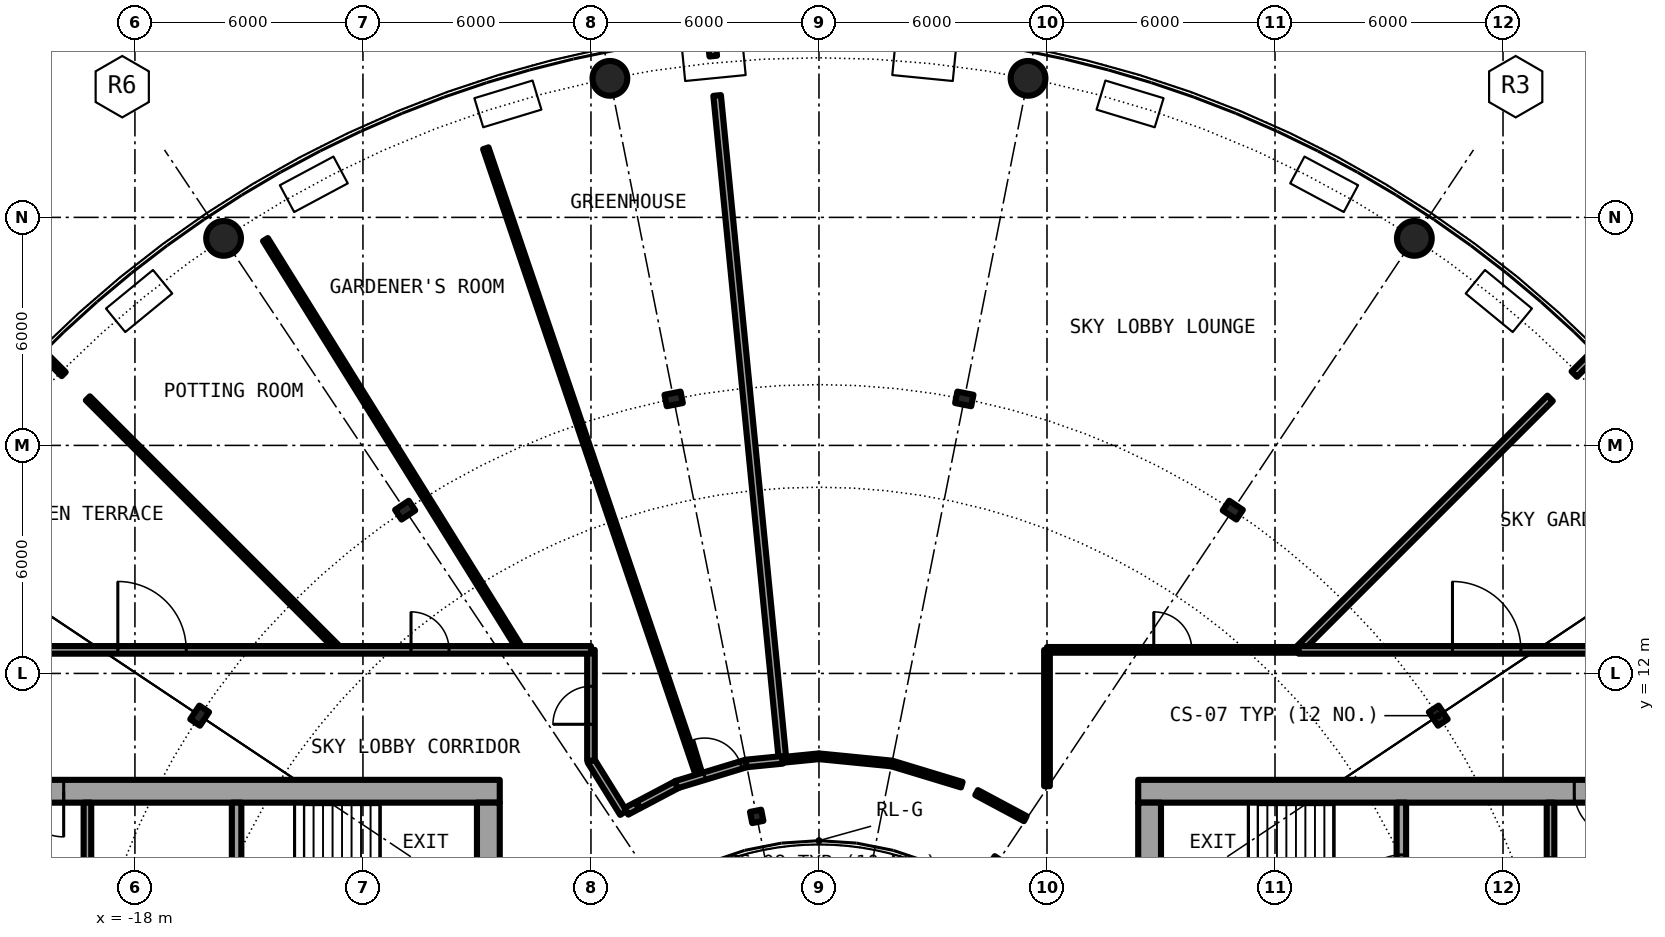
"""IFC4 building model, lengths in metres.
Left out: names, types, materials, properties, quantities, classifications, styles, units other than length and angle.
Written with IfcOpenShell. Run it as: python <this file> out.ifc"""

import sys

from ifc_helpers import new_model, si_unit, direction, frame, frame_2d, origin, origin_2d, place, context, subcontext, project, spatial, rectangle, hollow_circle, i_section, extrude, element, fill, save


model = new_model("IFC4")
c1 = context("Model", 3, precision=1e-05, world=origin(), true_north=direction((0.0, 1.0)))
c2 = subcontext(c1, "Body", "Model", "MODEL_VIEW")
j1 = project(units=[si_unit("LENGTHUNIT", "METRE"), si_unit("PLANEANGLEUNIT", "RADIAN")], contexts=[c1])
p1 = place(None, origin())
s1 = spatial("IfcSite", under=j1, at=p1, CompositionType="ELEMENT")
p2 = place(p1, origin())
s2 = spatial("IfcBuilding", under=s1, at=p2, CompositionType="ELEMENT")
p3 = place(p2, frame((0.0, 0.0, 139.1)))
s3 = spatial("IfcBuildingStorey", under=s2, at=p3, CompositionType="ELEMENT", Elevation=139.1)
for number, where, z_axis, x_axis in (
    (1, (15.667, 23.448, 0.0), (0.0, 0.0, 1.0), (1.0, 0.0, 0.0)),
    (2, (5.501, 27.658, 0.0), (0.0, 0.0, 1.0), (1.0, 0.0, 0.0)),
    (3, (-5.501, 27.658, 0.0), (0.0, 0.0, 1.0), (1.0, 0.0, 0.0)),
    (4, (-15.667, 23.448, 0.0), (0.0, 0.0, 1.0), (1.0, 0.0, 0.0)),
):
    element("IfcColumn", number, at=place(p3, frame(where, z_axis=z_axis, x_axis=x_axis)), inside=s3, PredefinedType="COLUMN", context=c2, shape_type="SweptSolid", body=[
        extrude(hollow_circle(Radius=0.457, WallThickness=0.04, at=origin_2d()), origin(), (0.0, 0.0, 1.0), 6.1),
    ])
for number, where, z_axis, x_axis in (
    (5, (16.297, 10.889, 0.0), (0.0, 0.0, 1.0), (0.831, 0.556, 0.0)),
    (6, (10.889, 16.297, 0.0), (0.0, 0.0, 1.0), (0.556, 0.831, 0.0)),
    (7, (3.824, 19.223, 0.0), (0.0, 0.0, 1.0), (0.195, 0.981, 0.0)),
    (8, (-3.824, 19.223, 0.0), (0.0, 0.0, 1.0), (-0.195, 0.981, 0.0)),
    (9, (-10.889, 16.297, 0.0), (0.0, 0.0, 1.0), (-0.556, 0.831, 0.0)),
    (10, (-16.297, 10.889, 0.0), (0.0, 0.0, 1.0), (-0.831, 0.556, 0.0)),
):
    element("IfcColumn", number, at=place(p3, frame(where, z_axis=z_axis, x_axis=x_axis)), inside=s3, PredefinedType="COLUMN", context=c2, shape_type="SweptSolid", body=[
        extrude(i_section(OverallWidth=0.307, OverallDepth=0.432, WebThickness=0.021, FlangeThickness=0.04, FilletRadius=0.027, at=origin_2d()), origin(), (0.0, 0.0, 1.0), 6.1),
    ])
for number, where, z_axis, x_axis in (
    (11, (4.667, 6.984, 0.0), (0.0, 0.0, 1.0), (0.556, 0.831, 0.0)),
    (12, (-1.639, 8.239, 0.0), (0.0, 0.0, 1.0), (-0.195, 0.981, 0.0)),
):
    element("IfcColumn", number, at=place(p3, frame(where, z_axis=z_axis, x_axis=x_axis)), inside=s3, PredefinedType="COLUMN", context=c2, shape_type="SweptSolid", body=[
        extrude(i_section(OverallWidth=0.3, OverallDepth=0.3, WebThickness=0.011, FlangeThickness=0.019, FilletRadius=0.027, at=origin_2d()), origin(), (0.0, 0.0, 1.0), 6.1),
    ])
p4 = place(p3, frame((22.2, 8.9, 0.0), z_axis=(0.0, 0.0, 1.0), x_axis=(-1.0, 0.0, 0.0)))
e13 = element("IfcWall", 13, at=p4, inside=s3, PredefinedType="SHEAR", context=c2, shape_type="SweptSolid", body=[
    extrude(rectangle(XDim=13.8, YDim=0.6, at=frame_2d((6.9, 0.0))), origin(), (0.0, 0.0, 1.0), 6.1),
])
p5 = place(p4, frame((1.125, 0.0, 0.0)))
e14 = element("IfcOpeningElement", 14, at=p5, cuts=e13, PredefinedType="OPENING", context=c2, shape_type="SweptSolid", body=[
    extrude(rectangle(XDim=1.2, YDim=2.3, at=frame_2d((0.6, 1.15))), frame((0.0, 0.31, 0.0), z_axis=(0.0, -1.0, 0.0), x_axis=(1.0, 0.0, 0.0)), (0.0, 0.0, 1.0), 0.62),
])
p6 = place(p3, frame((8.7, -8.6, 0.0), z_axis=(0.0, 0.0, 1.0), x_axis=(0.0, 1.0, 0.0)))
e15 = element("IfcWall", 15, at=p6, inside=s3, PredefinedType="SHEAR", context=c2, shape_type="SweptSolid", body=[
    extrude(rectangle(XDim=17.2, YDim=0.6, at=frame_2d((8.6, 0.0))), origin(), (0.0, 0.0, 1.0), 6.1),
])
p7 = place(p6, frame((7.4, 0.0, 0.1)))
e16 = element("IfcOpeningElement", 16, at=p7, cuts=e15, PredefinedType="OPENING", context=c2, shape_type="SweptSolid", body=[
    extrude(rectangle(XDim=2.4, YDim=2.2, at=frame_2d((1.2, 1.1))), frame((0.0, 0.31, 0.0), z_axis=(0.0, -1.0, 0.0), x_axis=(1.0, 0.0, 0.0)), (0.0, 0.0, 1.0), 0.62),
])
p8 = place(p3, frame((15.325, 4.65, 0.0), z_axis=(0.0, 0.0, 1.0), x_axis=(0.0, 1.0, 0.0)))
e17 = element("IfcWall", 17, at=p8, inside=s3, PredefinedType="SHEAR", context=c2, shape_type="SweptSolid", body=[
    extrude(rectangle(XDim=3.95, YDim=0.25, at=frame_2d((1.975, 0.0))), origin(), (0.0, 0.0, 1.0), 6.1),
])
p9 = place(p8, frame((1.375, 0.0, 0.0)))
e18 = element("IfcOpeningElement", 18, at=p9, cuts=e17, PredefinedType="OPENING", context=c2, shape_type="SweptSolid", body=[
    extrude(rectangle(XDim=1.2, YDim=2.3, at=frame_2d((0.6, 1.15))), frame((0.0, 0.135, 0.0), z_axis=(0.0, -1.0, 0.0), x_axis=(1.0, 0.0, 0.0)), (0.0, 0.0, 1.0), 0.27),
])
p10 = place(p3, frame((19.25, 1.575, 0.0), z_axis=(0.0, 0.0, 1.0), x_axis=(0.0, 1.0, 0.0)))
e19 = element("IfcWall", 19, at=p10, inside=s3, PredefinedType="SOLIDWALL", context=c2, shape_type="SweptSolid", body=[
    extrude(rectangle(XDim=7.025, YDim=0.2, at=frame_2d((3.513, 0.0))), origin(), (0.0, 0.0, 1.0), 5.75),
])
p11 = place(p10, frame((4.475, 0.0, 0.0)))
e20 = element("IfcOpeningElement", 20, at=p11, cuts=e19, PredefinedType="OPENING", context=c2, shape_type="SweptSolid", body=[
    extrude(rectangle(XDim=1.1, YDim=2.3, at=frame_2d((0.55, 1.15))), frame((0.0, 0.11, 0.0), z_axis=(0.0, -1.0, 0.0), x_axis=(1.0, 0.0, 0.0)), (0.0, 0.0, 1.0), 0.22),
])
p12 = place(p3, frame((-8.4, 8.9, 0.0), z_axis=(0.0, 0.0, 1.0), x_axis=(-1.0, 0.0, 0.0)))
e21 = element("IfcWall", 21, at=p12, inside=s3, PredefinedType="SHEAR", context=c2, shape_type="SweptSolid", body=[
    extrude(rectangle(XDim=13.8, YDim=0.6, at=frame_2d((6.9, 0.0))), origin(), (0.0, 0.0, 1.0), 6.1),
])
p13 = place(p12, frame((11.475, 0.0, 0.0)))
e22 = element("IfcOpeningElement", 22, at=p13, cuts=e21, PredefinedType="OPENING", context=c2, shape_type="SweptSolid", body=[
    extrude(rectangle(XDim=1.2, YDim=2.3, at=frame_2d((0.6, 1.15))), frame((0.0, 0.31, 0.0), z_axis=(0.0, -1.0, 0.0), x_axis=(1.0, 0.0, 0.0)), (0.0, 0.0, 1.0), 0.62),
])
p14 = place(p3, frame((-8.7, 8.6, 0.0), z_axis=(0.0, 0.0, 1.0), x_axis=(0.0, -1.0, 0.0)))
e23 = element("IfcWall", 23, at=p14, inside=s3, PredefinedType="SHEAR", context=c2, shape_type="SweptSolid", body=[
    extrude(rectangle(XDim=17.2, YDim=0.6, at=frame_2d((8.6, 0.0))), origin(), (0.0, 0.0, 1.0), 6.1),
])
p15 = place(p14, frame((7.4, 0.0, 0.1)))
e24 = element("IfcOpeningElement", 24, at=p15, cuts=e23, PredefinedType="OPENING", context=c2, shape_type="SweptSolid", body=[
    extrude(rectangle(XDim=2.4, YDim=2.2, at=frame_2d((1.2, 1.1))), frame((0.0, 0.31, 0.0), z_axis=(0.0, -1.0, 0.0), x_axis=(1.0, 0.0, 0.0)), (0.0, 0.0, 1.0), 0.62),
])
p16 = place(p3, frame((-15.325, 8.6, 0.0), z_axis=(0.0, 0.0, 1.0), x_axis=(0.0, -1.0, 0.0)))
e25 = element("IfcWall", 25, at=p16, inside=s3, PredefinedType="SHEAR", context=c2, shape_type="SweptSolid", body=[
    extrude(rectangle(XDim=3.95, YDim=0.25, at=frame_2d((1.975, 0.0))), origin(), (0.0, 0.0, 1.0), 6.1),
])
p17 = place(p16, frame((2.025, 0.0, 0.0)))
e26 = element("IfcOpeningElement", 26, at=p17, cuts=e25, PredefinedType="OPENING", context=c2, shape_type="SweptSolid", body=[
    extrude(rectangle(XDim=1.2, YDim=2.3, at=frame_2d((0.6, 1.15))), frame((0.0, 0.135, 0.0), z_axis=(0.0, -1.0, 0.0), x_axis=(1.0, 0.0, 0.0)), (0.0, 0.0, 1.0), 0.27),
])
p18 = place(p3, frame((-19.25, 8.6, 0.0), z_axis=(0.0, 0.0, 1.0), x_axis=(0.0, -1.0, 0.0)))
e27 = element("IfcWall", 27, at=p18, inside=s3, PredefinedType="SOLIDWALL", context=c2, shape_type="SweptSolid", body=[
    extrude(rectangle(XDim=7.025, YDim=0.2, at=frame_2d((3.513, 0.0))), origin(), (0.0, 0.0, 1.0), 5.75),
])
p19 = place(p18, frame((2.35, 0.0, 0.0)))
e28 = element("IfcOpeningElement", 28, at=p19, cuts=e27, PredefinedType="OPENING", context=c2, shape_type="SweptSolid", body=[
    extrude(rectangle(XDim=1.1, YDim=2.3, at=frame_2d((0.55, 1.15))), frame((0.0, 0.11, 0.0), z_axis=(0.0, -1.0, 0.0), x_axis=(1.0, 0.0, 0.0)), (0.0, 0.0, 1.0), 0.22),
])
p20 = place(p3, frame((6.0, 9.034, 0.0), z_axis=(0.0, 0.0, 1.0), x_axis=(0.0, 1.0, 0.0)))
e29 = element("IfcWall", 29, at=p20, inside=s3, PredefinedType="PARTITIONING", context=c2, shape_type="SweptSolid", body=[
    extrude(rectangle(XDim=3.586, YDim=0.15, at=frame_2d((1.793, 0.0))), origin(), (0.0, 0.0, 1.0), 5.75),
])
p21 = place(p3, frame((-20.365, 20.365, 0.0), z_axis=(0.0, 0.0, 1.0), x_axis=(0.707106781187, -0.707106781187, 0.0)))
e30 = element("IfcWall", 30, at=p21, inside=s3, PredefinedType="PARTITIONING", context=c2, shape_type="SweptSolid", body=[
    extrude(rectangle(XDim=0.693, YDim=0.15, at=frame_2d((0.346, 0.0))), origin(), (0.0, 0.0, 1.0), 5.75),
])
p22 = place(p3, frame((-19.239, 19.239, 0.0), z_axis=(0.0, 0.0, 1.0), x_axis=(0.707106781187, -0.707106781187, 0.0)))
e31 = element("IfcWall", 31, at=p22, inside=s3, PredefinedType="PARTITIONING", context=c2, shape_type="SweptSolid", body=[
    extrude(rectangle(XDim=9.361, YDim=0.15, at=frame_2d((4.68, 0.0))), origin(), (0.0, 0.0, 1.0), 5.75),
])
p23 = place(p3, frame((-14.566, 23.417, 0.0), z_axis=(0.0, 0.0, 1.0), x_axis=(0.528175151635, -0.849135448085, 0.0)))
e32 = element("IfcWall", 32, at=p23, inside=s3, PredefinedType="PARTITIONING", context=c2, shape_type="SweptSolid", body=[
    extrude(rectangle(XDim=12.715, YDim=0.15, at=frame_2d((6.357, 0.0))), origin(), (0.0, 0.0, 1.0), 5.75),
])
p24 = place(p3, frame((-8.767, 25.819, 0.0), z_axis=(0.0, 0.0, 1.0), x_axis=(0.321524803789, -0.946901156694, 0.0)))
e33 = element("IfcWall", 33, at=p24, inside=s3, PredefinedType="PARTITIONING", context=c2, shape_type="SweptSolid", body=[
    extrude(rectangle(XDim=17.489, YDim=0.15, at=frame_2d((8.744, 0.0))), origin(), (0.0, 0.0, 1.0), 5.75),
])
p25 = place(p3, frame((-2.81, 28.523, 0.0), z_axis=(0.0, 0.0, 1.0), x_axis=(0.099761386075, -0.995011389808, 0.0)))
e34 = element("IfcWall", 34, at=p25, inside=s3, PredefinedType="PARTITIONING", context=c2, shape_type="SweptSolid", body=[
    extrude(rectangle(XDim=0.281, YDim=0.2, at=frame_2d((0.141, 0.0))), origin(), (0.0, 0.0, 1.0), 5.75),
])
p26 = place(p3, frame((-2.68, 27.208, 0.0), z_axis=(0.0, 0.0, 1.0), x_axis=(0.098022984352, -0.995184151069, 0.0)))
e35 = element("IfcWall", 35, at=p26, inside=s3, PredefinedType="PARTITIONING", context=c2, shape_type="SweptSolid", body=[
    extrude(rectangle(XDim=17.567, YDim=0.2, at=frame_2d((8.783, 0.0))), origin(), (0.0, 0.0, 1.0), 5.75),
])
p27 = place(p3, frame((12.62, 12.62, 0.0), z_axis=(0.0, 0.0, 1.0), x_axis=(0.707106781187, 0.707106781187, 0.0)))
e36 = element("IfcWall", 36, at=p27, inside=s3, PredefinedType="PARTITIONING", context=c2, shape_type="SweptSolid", body=[
    extrude(rectangle(XDim=9.361, YDim=0.2, at=frame_2d((4.68, 0.0))), origin(), (0.0, 0.0, 1.0), 5.75),
])
p28 = place(p3, frame((19.875, 19.875, 0.0), z_axis=(0.0, 0.0, 1.0), x_axis=(0.707106781187, 0.707106781187, 0.0)))
e37 = element("IfcWall", 37, at=p28, inside=s3, PredefinedType="PARTITIONING", context=c2, shape_type="SweptSolid", body=[
    extrude(rectangle(XDim=0.693, YDim=0.2, at=frame_2d((0.346, 0.0))), origin(), (0.0, 0.0, 1.0), 5.75),
])
p29 = place(p3, frame((-6.0, 9.703, 0.0), z_axis=(0.0, 0.0, 1.0), x_axis=(0.527783933958, -0.849378666471, 0.0)))
e38 = element("IfcWall", 38, at=p29, inside=s3, PredefinedType="PARTITIONING", context=c2, shape_type="SweptSolid", body=[
    extrude(rectangle(XDim=1.616, YDim=0.2, at=frame_2d((0.808, 0.0))), origin(), (0.0, 0.0, 1.0), 5.75),
])
p30 = place(p3, frame((-6.0, 9.703, 0.0), z_axis=(0.0, 0.0, 1.0), x_axis=(0.0, 1.0, 0.0)))
e39 = element("IfcWall", 39, at=p30, inside=s3, PredefinedType="PARTITIONING", context=c2, shape_type="SweptSolid", body=[
    extrude(rectangle(XDim=2.917, YDim=0.2, at=frame_2d((1.458, 0.0))), origin(), (0.0, 0.0, 1.0), 5.75),
])
p31 = place(p30, frame((0.959, 0.0, 0.0)))
e40 = element("IfcOpeningElement", 40, at=p31, cuts=e39, PredefinedType="OPENING", context=c2, shape_type="SweptSolid", body=[
    extrude(rectangle(XDim=1.0, YDim=2.3, at=frame_2d((0.5, 1.15))), frame((0.0, 0.11, 0.0), z_axis=(0.0, -1.0, 0.0), x_axis=(1.0, 0.0, 0.0)), (0.0, 0.0, 1.0), 0.22),
])
p32 = place(p3, frame((-5.066, 8.373, 0.0), z_axis=(0.0, 0.0, 1.0), x_axis=(0.881628474014, 0.4719441003, 0.0)))
e41 = element("IfcWall", 41, at=p32, inside=s3, PredefinedType="PARTITIONING", context=c2, shape_type="SweptSolid", body=[
    extrude(rectangle(XDim=0.318, YDim=0.2, at=frame_2d((0.159, 0.0))), origin(), (0.0, 0.0, 1.0), 5.75),
])
p33 = place(p3, frame((-4.754, 8.538, 0.0), z_axis=(0.0, 0.0, 1.0), x_axis=(0.883879648041, 0.467714408352, 0.0)))
e42 = element("IfcWall", 42, at=p33, inside=s3, PredefinedType="PARTITIONING", context=c2, shape_type="SweptSolid", body=[
    extrude(rectangle(XDim=1.165, YDim=0.2, at=frame_2d((0.583, 0.0))), origin(), (0.0, 0.0, 1.0), 5.75),
])
p34 = place(p3, frame((-3.758, 9.072, 0.0), z_axis=(0.0, 0.0, 1.0), x_axis=(0.956896312675, 0.29042976223, 0.0)))
e43 = element("IfcWall", 43, at=p34, inside=s3, PredefinedType="PARTITIONING", context=c2, shape_type="SweptSolid", body=[
    extrude(rectangle(XDim=1.925, YDim=0.2, at=frame_2d((0.962, 0.0))), origin(), (0.0, 0.0, 1.0), 5.75),
])
p35 = place(p34, frame((0.783, 0.0, 0.0)))
e44 = element("IfcOpeningElement", 44, at=p35, cuts=e43, PredefinedType="OPENING", context=c2, shape_type="SweptSolid", body=[
    extrude(rectangle(XDim=1.0, YDim=2.3, at=frame_2d((0.5, 1.15))), frame((0.0, 0.11, 0.0), z_axis=(0.0, -1.0, 0.0), x_axis=(1.0, 0.0, 0.0)), (0.0, 0.0, 1.0), 0.22),
])
p36 = place(p3, frame((-1.916, 9.631, 0.0), z_axis=(0.0, 0.0, 1.0), x_axis=(0.995122193927, 0.098649983037, 0.0)))
e45 = element("IfcWall", 45, at=p36, inside=s3, PredefinedType="PARTITIONING", context=c2, shape_type="SweptSolid", body=[
    extrude(rectangle(XDim=0.963, YDim=0.2, at=frame_2d((0.481, 0.0))), origin(), (0.0, 0.0, 1.0), 5.75),
])
p37 = place(p3, frame((-0.963, 9.725, 0.0), z_axis=(0.0, 0.0, 1.0), x_axis=(0.995171182304, 0.098154561338, 0.0)))
e46 = element("IfcWall", 46, at=p37, inside=s3, PredefinedType="PARTITIONING", context=c2, shape_type="SweptSolid", body=[
    extrude(rectangle(XDim=0.968, YDim=0.15, at=frame_2d((0.484, 0.0))), origin(), (0.0, 0.0, 1.0), 5.75),
])
p38 = place(p3, frame((0.0, 9.82, 0.0), z_axis=(0.0, 0.0, 1.0), x_axis=(0.995171860647, -0.098147683504, 0.0)))
e47 = element("IfcWall", 47, at=p38, inside=s3, PredefinedType="PARTITIONING", context=c2, shape_type="SweptSolid", body=[
    extrude(rectangle(XDim=1.925, YDim=0.15, at=frame_2d((0.963, 0.0))), origin(), (0.0, 0.0, 1.0), 5.75),
])
p39 = place(p3, frame((1.916, 9.631, 0.0), z_axis=(0.0, 0.0, 1.0), x_axis=(0.956896312675, -0.29042976223, 0.0)))
e48 = element("IfcWall", 48, at=p39, inside=s3, PredefinedType="PARTITIONING", context=c2, shape_type="SweptSolid", body=[
    extrude(rectangle(XDim=1.925, YDim=0.15, at=frame_2d((0.962, 0.0))), origin(), (0.0, 0.0, 1.0), 5.75),
])
p40 = place(p3, frame((4.148, 8.864, 0.0), z_axis=(0.0, 0.0, 1.0), x_axis=(0.881822025569, -0.471582352534, 0.0)))
e49 = element("IfcWall", 49, at=p40, inside=s3, PredefinedType="PARTITIONING", context=c2, shape_type="SweptSolid", body=[
    extrude(rectangle(XDim=1.453, YDim=0.15, at=frame_2d((0.726, 0.0))), origin(), (0.0, 0.0, 1.0), 5.75),
])
p41 = place(p3, frame((-21.9, 12.62, 0.0), z_axis=(0.0, 0.0, 1.0), x_axis=(1.0, 0.0, 0.0)))
e50 = element("IfcWall", 50, at=p41, inside=s3, PredefinedType="PARTITIONING", context=c2, shape_type="SweptSolid", body=[
    extrude(rectangle(XDim=15.9, YDim=0.2, at=frame_2d((7.95, 0.0))), origin(), (0.0, 0.0, 1.0), 5.75),
])
p42 = place(p41, frame((11.165, 0.0, 0.0)))
e51 = element("IfcOpeningElement", 51, at=p42, cuts=e50, PredefinedType="OPENING", context=c2, shape_type="SweptSolid", body=[
    extrude(rectangle(XDim=1.0, YDim=2.3, at=frame_2d((0.5, 1.15))), frame((0.0, 0.11, 0.0), z_axis=(0.0, -1.0, 0.0), x_axis=(1.0, 0.0, 0.0)), (0.0, 0.0, 1.0), 0.22),
])
p43 = place(p41, frame((3.45, 0.0, 0.0)))
e52 = element("IfcOpeningElement", 52, at=p43, cuts=e50, PredefinedType="OPENING", context=c2, shape_type="SweptSolid", body=[
    extrude(rectangle(XDim=1.8, YDim=2.3, at=frame_2d((0.9, 1.15))), frame((0.0, 0.11, 0.0), z_axis=(0.0, -1.0, 0.0), x_axis=(1.0, 0.0, 0.0)), (0.0, 0.0, 1.0), 0.22),
])
p44 = place(p3, frame((6.0, 12.62, 0.0), z_axis=(0.0, 0.0, 1.0), x_axis=(1.0, 0.0, 0.0)))
e53 = element("IfcWall", 53, at=p44, inside=s3, PredefinedType="PARTITIONING", context=c2, shape_type="SweptSolid", body=[
    extrude(rectangle(XDim=6.62, YDim=0.15, at=frame_2d((3.31, 0.0))), origin(), (0.0, 0.0, 1.0), 5.75),
])
p45 = place(p44, frame((2.81, 0.0, 0.0)))
e54 = element("IfcOpeningElement", 54, at=p45, cuts=e53, PredefinedType="OPENING", context=c2, shape_type="SweptSolid", body=[
    extrude(rectangle(XDim=1.0, YDim=2.3, at=frame_2d((0.5, 1.15))), frame((0.0, 0.085, 0.0), z_axis=(0.0, -1.0, 0.0), x_axis=(1.0, 0.0, 0.0)), (0.0, 0.0, 1.0), 0.17),
])
p46 = place(p3, frame((12.62, 12.62, 0.0), z_axis=(0.0, 0.0, 1.0), x_axis=(1.0, 0.0, 0.0)))
e55 = element("IfcWall", 55, at=p46, inside=s3, PredefinedType="PARTITIONING", context=c2, shape_type="SweptSolid", body=[
    extrude(rectangle(XDim=9.28, YDim=0.2, at=frame_2d((4.64, 0.0))), origin(), (0.0, 0.0, 1.0), 5.75),
])
p47 = place(p46, frame((4.05, 0.0, 0.0)))
e56 = element("IfcOpeningElement", 56, at=p47, cuts=e55, PredefinedType="OPENING", context=c2, shape_type="SweptSolid", body=[
    extrude(rectangle(XDim=1.8, YDim=2.3, at=frame_2d((0.9, 1.15))), frame((0.0, 0.11, 0.0), z_axis=(0.0, -1.0, 0.0), x_axis=(1.0, 0.0, 0.0)), (0.0, 0.0, 1.0), 0.22),
])
p48 = place(p9, origin())
e57 = element("IfcDoor", 57, at=p48, inside=s3, OperationType="SINGLE_SWING_LEFT", PredefinedType="DOOR", context=c2, shape_type="SweptSolid", body=[
    extrude(rectangle(XDim=1.2, YDim=2.3, at=frame_2d((0.6, 1.15))), frame((0.0, 0.025, 0.0), z_axis=(0.0, -1.0, 0.0), x_axis=(1.0, 0.0, 0.0)), (0.0, 0.0, 1.0), 0.05),
])
fill(e18, e57)
p49 = place(p5, origin())
e58 = element("IfcDoor", 58, at=p49, inside=s3, OperationType="SINGLE_SWING_RIGHT", PredefinedType="DOOR", context=c2, shape_type="SweptSolid", body=[
    extrude(rectangle(XDim=1.2, YDim=2.3, at=frame_2d((0.6, 1.15))), frame((0.0, 0.025, 0.0), z_axis=(0.0, -1.0, 0.0), x_axis=(1.0, 0.0, 0.0)), (0.0, 0.0, 1.0), 0.05),
])
fill(e14, e58)
p50 = place(p13, origin())
e59 = element("IfcDoor", 59, at=p50, inside=s3, OperationType="SINGLE_SWING_LEFT", PredefinedType="DOOR", context=c2, shape_type="SweptSolid", body=[
    extrude(rectangle(XDim=1.2, YDim=2.3, at=frame_2d((0.6, 1.15))), frame((0.0, 0.025, 0.0), z_axis=(0.0, -1.0, 0.0), x_axis=(1.0, 0.0, 0.0)), (0.0, 0.0, 1.0), 0.05),
])
fill(e22, e59)
p51 = place(p45, origin())
e60 = element("IfcDoor", 60, at=p51, inside=s3, OperationType="SINGLE_SWING_LEFT", PredefinedType="DOOR", context=c2, shape_type="SweptSolid", body=[
    extrude(rectangle(XDim=1.0, YDim=2.3, at=frame_2d((0.5, 1.15))), frame((0.0, 0.025, 0.0), z_axis=(0.0, -1.0, 0.0), x_axis=(1.0, 0.0, 0.0)), (0.0, 0.0, 1.0), 0.05),
])
fill(e54, e60)
p52 = place(p35, origin())
e61 = element("IfcDoor", 61, at=p52, inside=s3, OperationType="SINGLE_SWING_RIGHT", PredefinedType="DOOR", context=c2, shape_type="SweptSolid", body=[
    extrude(rectangle(XDim=1.0, YDim=2.3, at=frame_2d((0.5, 1.15))), frame((0.0, 0.025, 0.0), z_axis=(0.0, -1.0, 0.0), x_axis=(1.0, 0.0, 0.0)), (0.0, 0.0, 1.0), 0.05),
])
fill(e44, e61)
p53 = place(p31, origin())
e62 = element("IfcDoor", 62, at=p53, inside=s3, OperationType="SINGLE_SWING_RIGHT", PredefinedType="DOOR", context=c2, shape_type="SweptSolid", body=[
    extrude(rectangle(XDim=1.0, YDim=2.3, at=frame_2d((0.5, 1.15))), frame((0.0, 0.025, 0.0), z_axis=(0.0, -1.0, 0.0), x_axis=(1.0, 0.0, 0.0)), (0.0, 0.0, 1.0), 0.05),
])
fill(e40, e62)
p54 = place(p42, origin())
e63 = element("IfcDoor", 63, at=p54, inside=s3, OperationType="SINGLE_SWING_RIGHT", PredefinedType="DOOR", context=c2, shape_type="SweptSolid", body=[
    extrude(rectangle(XDim=1.0, YDim=2.3, at=frame_2d((0.5, 1.15))), frame((0.0, 0.025, 0.0), z_axis=(0.0, -1.0, 0.0), x_axis=(1.0, 0.0, 0.0)), (0.0, 0.0, 1.0), 0.05),
])
fill(e51, e63)
p55 = place(p47, origin())
e64 = element("IfcDoor", 64, at=p55, inside=s3, OperationType="DOUBLE_DOOR_SINGLE_SWING", PredefinedType="DOOR", context=c2, shape_type="SweptSolid", body=[
    extrude(rectangle(XDim=1.8, YDim=2.3, at=frame_2d((0.9, 1.15))), frame((0.0, 0.025, 0.0), z_axis=(0.0, -1.0, 0.0), x_axis=(1.0, 0.0, 0.0)), (0.0, 0.0, 1.0), 0.05),
])
fill(e56, e64)
p56 = place(p43, origin())
e65 = element("IfcDoor", 65, at=p56, inside=s3, OperationType="DOUBLE_DOOR_SINGLE_SWING", PredefinedType="DOOR", context=c2, shape_type="SweptSolid", body=[
    extrude(rectangle(XDim=1.8, YDim=2.3, at=frame_2d((0.9, 1.15))), frame((0.0, 0.025, 0.0), z_axis=(0.0, -1.0, 0.0), x_axis=(1.0, 0.0, 0.0)), (0.0, 0.0, 1.0), 0.05),
])
fill(e52, e65)
save(model, sys.argv[1])
